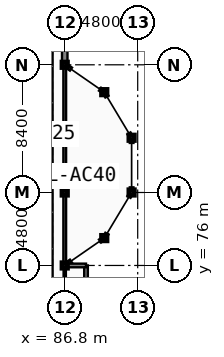
"""IFC4 building model, lengths in metres.
Left out: names, types, materials, properties, quantities, classifications, styles, units other than length and angle.
Written with IfcOpenShell. Run it as: python <this file> out.ifc"""

import sys

from ifc_helpers import new_model, si_unit, direction, frame, frame_2d, origin, origin_2d, place, context, subcontext, project, spatial, rectangle, extrude, element, fill, save


model = new_model("IFC4")
c1 = context("Model", 3, precision=1e-05, world=origin(), true_north=direction((0.0, 1.0)))
c2 = subcontext(c1, "Body", "Model", "MODEL_VIEW")
j1 = project(units=[si_unit("LENGTHUNIT", "METRE"), si_unit("PLANEANGLEUNIT", "RADIAN")], contexts=[c1])
p1 = place(None, origin())
s1 = spatial("IfcSite", under=j1, at=p1, CompositionType="ELEMENT")
p2 = place(p1, origin())
s2 = spatial("IfcBuilding", under=s1, at=p2, CompositionType="ELEMENT")
p3 = place(p2, frame((0.0, 0.0, 17.7)))
s3 = spatial("IfcBuildingStorey", under=s2, at=p3, CompositionType="ELEMENT", Elevation=17.7)
for number, where, z_axis, x_axis in (
    (1, (86.8, 76.0, 0.0), (0.0, 0.0, 1.0), (1.0, 0.0, 0.0)),
    (2, (86.8, 80.8, 0.0), (0.0, 0.0, 1.0), (1.0, 0.0, 0.0)),
    (3, (86.8, 89.2, 0.0), (0.0, 0.0, 1.0), (1.0, 0.0, 0.0)),
    (4, (89.4, 77.8, 0.0), (0.0, 0.0, 1.0), (1.0, 0.0, 0.0)),
    (5, (89.4, 87.4, 0.0), (0.0, 0.0, 1.0), (1.0, 0.0, 0.0)),
    (6, (91.2, 80.8, 0.0), (0.0, 0.0, 1.0), (1.0, 0.0, 0.0)),
    (7, (91.2, 84.4, 0.0), (0.0, 0.0, 1.0), (1.0, 0.0, 0.0)),
):
    element("IfcColumn", number, at=place(p3, frame(where, z_axis=z_axis, x_axis=x_axis)), inside=s3, PredefinedType="COLUMN", context=c2, shape_type="SweptSolid", body=[
        extrude(rectangle(XDim=0.36, YDim=0.36, at=origin_2d()), origin(), (0.0, 0.0, 1.0), 3.9),
    ])
p4 = place(p3, frame((86.8, 67.6, 0.0), z_axis=(0.0, 0.0, 1.0), x_axis=(0.0, 1.0, 0.0)))
e8 = element("IfcWall", 8, at=p4, inside=s3, PredefinedType="PARTITIONING", context=c2, shape_type="SweptSolid", body=[
    extrude(rectangle(XDim=8.4, YDim=0.15, at=frame_2d((4.2, 0.0))), origin(), (0.0, 0.0, 1.0), 3.32),
])
p5 = place(p4, frame((3.7, 0.0, -0.01)))
e9 = element("IfcOpeningElement", 9, at=p5, cuts=e8, PredefinedType="OPENING", context=c2, shape_type="SweptSolid", body=[
    extrude(rectangle(XDim=1.0, YDim=2.16, at=frame_2d((0.5, 1.08))), frame((0.0, 0.085, 0.0), z_axis=(0.0, -1.0, 0.0), x_axis=(1.0, 0.0, 0.0)), (0.0, 0.0, 1.0), 0.17),
])
p6 = place(p3, frame((86.8, 76.0, 0.0), z_axis=(0.0, 0.0, 1.0), x_axis=(0.0, 1.0, 0.0)))
e10 = element("IfcWall", 10, at=p6, inside=s3, PredefinedType="PARTITIONING", context=c2, shape_type="SweptSolid", body=[
    extrude(rectangle(XDim=13.2, YDim=0.18, at=frame_2d((6.6, 0.0))), origin(), (0.0, 0.0, 1.0), 3.32),
])
p7 = place(p6, frame((5.8, 0.0, -0.01)))
e11 = element("IfcOpeningElement", 11, at=p7, cuts=e10, PredefinedType="OPENING", context=c2, shape_type="SweptSolid", body=[
    extrude(rectangle(XDim=1.6, YDim=2.21, at=frame_2d((0.8, 1.105))), frame((0.0, 0.1, 0.0), z_axis=(0.0, -1.0, 0.0), x_axis=(1.0, 0.0, 0.0)), (0.0, 0.0, 1.0), 0.2),
])
p8 = place(p3, frame((86.8, 89.2, 0.0), z_axis=(0.0, 0.0, 1.0), x_axis=(0.0, 1.0, 0.0)))
e12 = element("IfcWall", 12, at=p8, inside=s3, PredefinedType="SOLIDWALL", context=c2, shape_type="SweptSolid", body=[
    extrude(rectangle(XDim=8.4, YDim=0.36, at=frame_2d((4.2, 0.0))), origin(), (0.0, 0.0, 1.0), 3.32),
])
p9 = place(p8, frame((0.46, 0.0, 0.75)))
e13 = element("IfcOpeningElement", 13, at=p9, cuts=e12, PredefinedType="OPENING", context=c2, shape_type="SweptSolid", body=[
    extrude(rectangle(XDim=1.55, YDim=2.3, at=frame_2d((0.775, 1.15))), frame((0.0, 0.19, 0.0), z_axis=(0.0, -1.0, 0.0), x_axis=(1.0, 0.0, 0.0)), (0.0, 0.0, 1.0), 0.38),
])
p10 = place(p8, frame((6.26, 0.0, 0.75)))
e14 = element("IfcOpeningElement", 14, at=p10, cuts=e12, PredefinedType="OPENING", context=c2, shape_type="SweptSolid", body=[
    extrude(rectangle(XDim=1.55, YDim=2.3, at=frame_2d((0.775, 1.15))), frame((0.0, 0.19, 0.0), z_axis=(0.0, -1.0, 0.0), x_axis=(1.0, 0.0, 0.0)), (0.0, 0.0, 1.0), 0.38),
])
p11 = place(p3, frame((87.03, 76.159, 0.0), z_axis=(0.0, 0.0, 1.0), x_axis=(0.822192191644, 0.56920997883, 0.0)))
e15 = element("IfcWall", 15, at=p11, inside=s3, PredefinedType="SOLIDWALL", context=c2, shape_type="SweptSolid", body=[
    extrude(rectangle(XDim=0.22, YDim=0.24, at=frame_2d((0.11, 0.0))), origin(), (0.0, 0.0, 1.0), 3.32),
])
p12 = place(p3, frame((89.121, 77.606, 0.0), z_axis=(0.0, 0.0, 1.0), x_axis=(0.821855834467, 0.569695521619, 0.0)))
e16 = element("IfcWall", 16, at=p12, inside=s3, PredefinedType="SOLIDWALL", context=c2, shape_type="SweptSolid", body=[
    extrude(rectangle(XDim=0.34, YDim=0.24, at=frame_2d((0.17, 0.0))), origin(), (0.0, 0.0, 1.0), 3.32),
])
p13 = place(p3, frame((89.4, 77.8, 0.0), z_axis=(0.0, 0.0, 1.0), x_axis=(0.514812489021, 0.857302805984, 0.0)))
e17 = element("IfcWall", 17, at=p13, inside=s3, PredefinedType="SOLIDWALL", context=c2, shape_type="SweptSolid", body=[
    extrude(rectangle(XDim=0.34, YDim=0.24, at=frame_2d((0.17, 0.0))), origin(), (0.0, 0.0, 1.0), 3.32),
])
for number, where, z_axis, x_axis in (
    (18, (91.025, 80.509, 0.0), (0.0, 0.0, 1.0), (0.514, 0.858, 0.0)),
    (19, (91.2, 80.8, 0.0), (0.0, 0.0, 1.0), (0.0, 1.0, 0.0)),
    (20, (91.2, 84.06, 0.0), (0.0, 0.0, 1.0), (0.0, 1.0, 0.0)),
    (21, (91.2, 84.4, 0.0), (0.0, 0.0, 1.0), (-0.514, 0.858, 0.0)),
):
    element("IfcWall", number, at=place(p3, frame(where, z_axis=z_axis, x_axis=x_axis)), inside=s3, PredefinedType="SOLIDWALL", context=c2, shape_type="SweptSolid", body=[
        extrude(rectangle(XDim=0.34, YDim=0.24, at=frame_2d((0.17, 0.0))), origin(), (0.0, 0.0, 1.0), 3.32),
    ])
p14 = place(p3, frame((89.575, 87.108, 0.0), z_axis=(0.0, 0.0, 1.0), x_axis=(-0.514812489021, 0.857302805984, 0.0)))
e22 = element("IfcWall", 22, at=p14, inside=s3, PredefinedType="SOLIDWALL", context=c2, shape_type="SweptSolid", body=[
    extrude(rectangle(XDim=0.34, YDim=0.24, at=frame_2d((0.17, 0.0))), origin(), (0.0, 0.0, 1.0), 3.32),
])
p15 = place(p3, frame((89.4, 87.4, 0.0), z_axis=(0.0, 0.0, 1.0), x_axis=(-0.821855834467, 0.569695521619, 0.0)))
e23 = element("IfcWall", 23, at=p15, inside=s3, PredefinedType="SOLIDWALL", context=c2, shape_type="SweptSolid", body=[
    extrude(rectangle(XDim=0.34, YDim=0.24, at=frame_2d((0.17, 0.0))), origin(), (0.0, 0.0, 1.0), 3.32),
])
p16 = place(p3, frame((87.211, 88.915, 0.0), z_axis=(0.0, 0.0, 1.0), x_axis=(-0.822192191644, 0.56920997883, 0.0)))
e24 = element("IfcWall", 24, at=p16, inside=s3, PredefinedType="SOLIDWALL", context=c2, shape_type="SweptSolid", body=[
    extrude(rectangle(XDim=0.22, YDim=0.24, at=frame_2d((0.11, 0.0))), origin(), (0.0, 0.0, 1.0), 3.32),
])
p17 = place(p3, frame((88.2, 67.6, 0.0), z_axis=(0.0, 0.0, 1.0), x_axis=(0.0, 1.0, 0.0)))
e25 = element("IfcWall", 25, at=p17, inside=s3, PredefinedType="SOLIDWALL", context=c2, shape_type="SweptSolid", body=[
    extrude(rectangle(XDim=8.4, YDim=0.24, at=frame_2d((4.2, 0.0))), origin(), (0.0, 0.0, 1.0), 3.32),
])
p18 = place(p17, frame((0.46, 0.0, 0.65)))
e26 = element("IfcOpeningElement", 26, at=p18, cuts=e25, PredefinedType="OPENING", context=c2, shape_type="SweptSolid", body=[
    extrude(rectangle(XDim=2.4, YDim=2.1, at=frame_2d((1.2, 1.05))), frame((0.0, 0.13, 0.0), z_axis=(0.0, -1.0, 0.0), x_axis=(1.0, 0.0, 0.0)), (0.0, 0.0, 1.0), 0.26),
])
p19 = place(p17, frame((5.46, 0.0, 0.65)))
e27 = element("IfcOpeningElement", 27, at=p19, cuts=e25, PredefinedType="OPENING", context=c2, shape_type="SweptSolid", body=[
    extrude(rectangle(XDim=2.4, YDim=2.1, at=frame_2d((1.2, 1.05))), frame((0.0, 0.13, 0.0), z_axis=(0.0, -1.0, 0.0), x_axis=(1.0, 0.0, 0.0)), (0.0, 0.0, 1.0), 0.26),
])
p20 = place(p3, frame((88.2, 76.0, 0.0), z_axis=(0.0, 0.0, 1.0), x_axis=(-1.0, 0.0, 0.0)))
e28 = element("IfcWall", 28, at=p20, inside=s3, PredefinedType="SOLIDWALL", context=c2, shape_type="SweptSolid", body=[
    extrude(rectangle(XDim=1.4, YDim=0.24, at=frame_2d((0.7, 0.0))), origin(), (0.0, 0.0, 1.0), 3.32),
])
p21 = place(p7, frame((1.6, 0.0, 0.01), z_axis=(0.0, 0.0, 1.0), x_axis=(-1.0, 0.0, 0.0)))
e29 = element("IfcDoor", 29, at=p21, inside=s3, OperationType="DOUBLE_SWING_LEFT", PredefinedType="DOOR", context=c2, shape_type="SweptSolid", body=[
    extrude(rectangle(XDim=1.6, YDim=2.2, at=frame_2d((0.8, 1.1))), frame((0.0, 0.025, 0.0), z_axis=(0.0, -1.0, 0.0), x_axis=(1.0, 0.0, 0.0)), (0.0, 0.0, 1.0), 0.05),
])
fill(e11, e29)
p22 = place(p9, origin())
e30 = element("IfcWindow", 30, at=p22, inside=s3, PartitioningType="DOUBLE_PANEL_HORIZONTAL", PredefinedType="WINDOW", context=c2, shape_type="SweptSolid", body=[
    extrude(rectangle(XDim=1.55, YDim=2.3, at=frame_2d((0.775, 1.15))), frame((0.0, 0.03, 0.0), z_axis=(0.0, -1.0, 0.0), x_axis=(1.0, 0.0, 0.0)), (0.0, 0.0, 1.0), 0.06),
])
fill(e13, e30)
p23 = place(p19, origin())
e31 = element("IfcWindow", 31, at=p23, inside=s3, PartitioningType="TRIPLE_PANEL_VERTICAL", PredefinedType="WINDOW", context=c2, shape_type="SweptSolid", body=[
    extrude(rectangle(XDim=2.4, YDim=2.1, at=frame_2d((1.2, 1.05))), frame((0.0, 0.03, 0.0), z_axis=(0.0, -1.0, 0.0), x_axis=(1.0, 0.0, 0.0)), (0.0, 0.0, 1.0), 0.06),
])
fill(e27, e31)
save(model, sys.argv[1])
